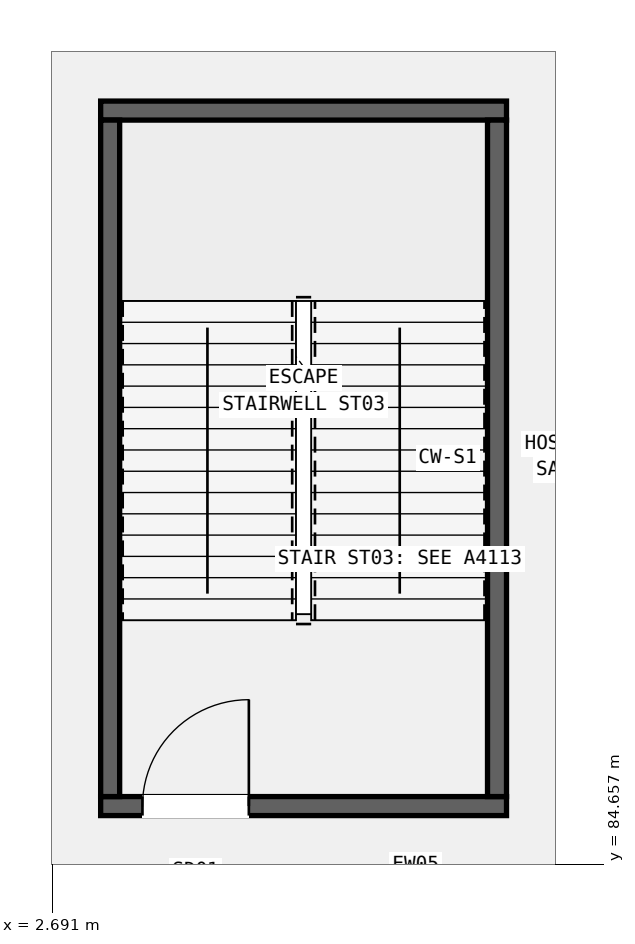
"""IFC4 building model, lengths in metres.
Left out: names, types, materials, properties, quantities, classifications, styles, units other than length and angle.
Written with IfcOpenShell. Run it as: python <this file> out.ifc"""

import sys

from ifc_helpers import new_model, si_unit, direction, frame, frame_2d, origin, place, context, subcontext, project, spatial, rectangle, extrude, element, fill, save


model = new_model("IFC4")
c1 = context("Model", 3, precision=1e-05, world=origin(), true_north=direction((0.0, 1.0)))
c2 = subcontext(c1, "Body", "Model", "MODEL_VIEW")
j1 = project(units=[si_unit("LENGTHUNIT", "METRE"), si_unit("PLANEANGLEUNIT", "RADIAN")], contexts=[c1])
p1 = place(None, origin())
s1 = spatial("IfcSite", under=j1, at=p1, CompositionType="ELEMENT")
p2 = place(p1, origin())
s2 = spatial("IfcBuilding", under=s1, at=p2, CompositionType="ELEMENT")
p3 = place(p2, frame((0.0, 0.0, 20.4)))
s3 = spatial("IfcBuildingStorey", under=s2, at=p3, CompositionType="ELEMENT", Elevation=20.4)
p4 = place(p3, frame((3.33, 85.425, 0.0), z_axis=(0.0, 0.0, 1.0), x_axis=(1.0, 0.0, 0.0)))
e1 = element("IfcWall", 1, at=p4, inside=s3, PredefinedType="SHEAR", context=c2, shape_type="SweptSolid", body=[
    extrude(rectangle(XDim=5.34, YDim=0.25, at=frame_2d((2.67, 0.0))), origin(), (0.0, 0.0, 1.0), 5.18),
])
p5 = place(p4, frame((0.55, 0.0, 0.0)))
e2 = element("IfcOpeningElement", 2, at=p5, cuts=e1, PredefinedType="OPENING", context=c2, shape_type="SweptSolid", body=[
    extrude(rectangle(XDim=1.4, YDim=2.15, at=frame_2d((0.7, 1.075))), frame((0.0, 0.135, 0.0), z_axis=(0.0, -1.0, 0.0), x_axis=(1.0, 0.0, 0.0)), (0.0, 0.0, 1.0), 0.27),
])
p6 = place(p3, frame((3.33, 94.575, 0.0), z_axis=(0.0, 0.0, 1.0), x_axis=(1.0, 0.0, 0.0)))
e3 = element("IfcWall", 3, at=p6, inside=s3, PredefinedType="SHEAR", context=c2, shape_type="SweptSolid", body=[
    extrude(rectangle(XDim=5.34, YDim=0.25, at=frame_2d((2.67, 0.0))), origin(), (0.0, 0.0, 1.0), 5.18),
])
for number, where, z_axis, x_axis in (
    (4, (3.455, 85.55, 0.0), (0.0, 0.0, 1.0), (0.0, 1.0, 0.0)),
    (5, (8.545, 85.55, 0.0), (0.0, 0.0, 1.0), (0.0, 1.0, 0.0)),
):
    element("IfcWall", number, at=place(p3, frame(where, z_axis=z_axis, x_axis=x_axis)), inside=s3, PredefinedType="SHEAR", context=c2, shape_type="SweptSolid", body=[
        extrude(rectangle(XDim=8.9, YDim=0.25, at=frame_2d((4.45, 0.0))), origin(), (0.0, 0.0, 1.0), 5.18),
    ])
p7 = place(p5, origin())
e6 = element("IfcDoor", 6, at=p7, inside=s3, OperationType="SINGLE_SWING_RIGHT", PredefinedType="DOOR", context=c2, shape_type="SweptSolid", body=[
    extrude(rectangle(XDim=1.4, YDim=2.15, at=frame_2d((0.7, 1.075))), frame((0.0, 0.025, 0.0), z_axis=(0.0, -1.0, 0.0), x_axis=(1.0, 0.0, 0.0)), (0.0, 0.0, 1.0), 0.05),
])
fill(e2, e6)
save(model, sys.argv[1])
